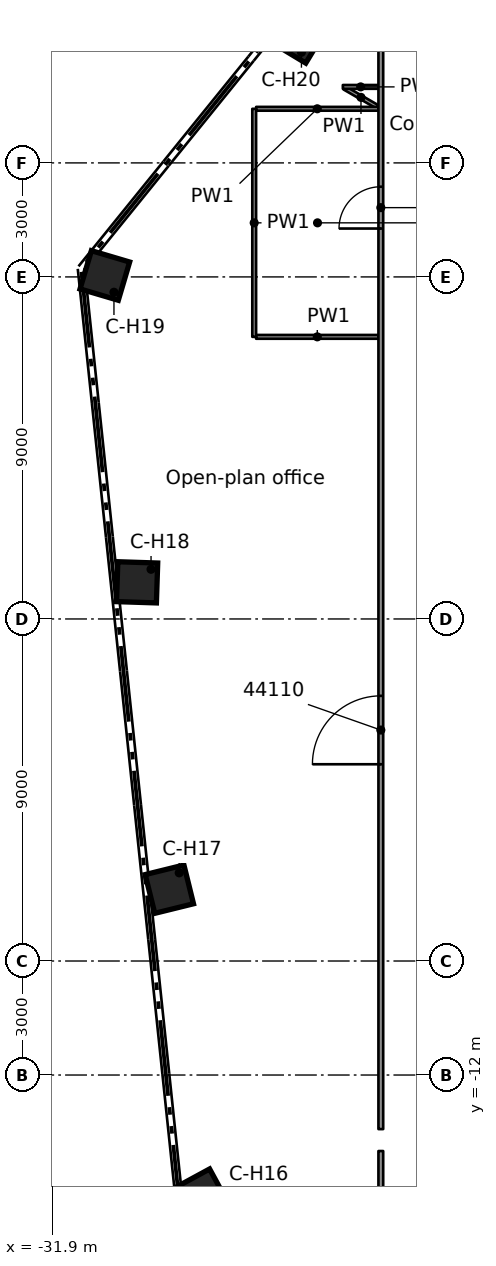
"""IFC4 building model, lengths in metres.
Left out: names, types, materials, properties, quantities, classifications, styles, units other than length and angle.
Written with IfcOpenShell. Run it as: python <this file> out.ifc"""

import sys

from ifc_helpers import new_model, si_unit, direction, frame, frame_2d, origin, origin_2d, place, context, subcontext, project, spatial, rectangle, extrude, element, fill, save


model = new_model("IFC4")
c1 = context("Model", 3, precision=1e-05, world=origin(), true_north=direction((0.0, 1.0)))
c2 = subcontext(c1, "Body", "Model", "MODEL_VIEW")
j1 = project(units=[si_unit("LENGTHUNIT", "METRE"), si_unit("PLANEANGLEUNIT", "RADIAN")], contexts=[c1])
p1 = place(None, origin())
s1 = spatial("IfcSite", under=j1, at=p1, CompositionType="ELEMENT")
p2 = place(p1, origin())
s2 = spatial("IfcBuilding", under=s1, at=p2, CompositionType="ELEMENT")
p3 = place(p2, frame((0.0, 0.0, 217.5)))
s3 = spatial("IfcBuildingStorey", under=s2, at=p3, CompositionType="ELEMENT", Elevation=217.5)
for number, where, z_axis, x_axis in (
    (1, (-27.966, -15.184, 0.0), (0.0, 0.0, 1.0), (-0.879, -0.477, 0.0)),
    (2, (-28.815, -7.11, 0.0), (0.0, 0.0, 1.0), (-0.971, -0.24, 0.0)),
    (3, (-29.663, 0.964, 0.0), (0.0, 0.0, 1.0), (-0.999, 0.032, 0.0)),
    (4, (-30.512, 9.038, 0.0), (0.0, 0.0, 1.0), (-0.959, 0.284, 0.0)),
    (5, (-25.403, 15.347, 0.0), (0.0, 0.0, 1.0), (-0.856, 0.517, 0.0)),
):
    element("IfcColumn", number, at=place(p3, frame(where, z_axis=z_axis, x_axis=x_axis)), inside=s3, PredefinedType="COLUMN", context=c2, shape_type="SweptSolid", body=[
        extrude(rectangle(XDim=1.05, YDim=1.05, at=origin_2d()), origin(), (0.0, 0.0, 1.0), 3.5),
    ])
p4 = place(p3, frame((-24.206, 13.975, 0.0), z_axis=(0.0, 0.0, 1.0), x_axis=(0.866136921896, -0.4998067952, 0.0)))
e6 = element("IfcWall", 6, at=p4, inside=s3, PredefinedType="PARTITIONING", context=c2, shape_type="SweptSolid", body=[
    extrude(rectangle(XDim=1.002, YDim=0.1, at=frame_2d((0.501, 0.0))), origin(), (0.0, 0.0, 1.0), 3.06),
])
p5 = place(p3, frame((-26.532, 7.423, 0.0), z_axis=(0.0, 0.0, 1.0), x_axis=(1.0, 0.0, 0.0)))
e7 = element("IfcWall", 7, at=p5, inside=s3, PredefinedType="PARTITIONING", context=c2, shape_type="SweptSolid", body=[
    extrude(rectangle(XDim=3.22, YDim=0.1, at=frame_2d((1.61, 0.0))), origin(), (0.0, 0.0, 1.0), 3.06),
])
p6 = place(p3, frame((-26.531, 13.424, 0.0), z_axis=(0.0, 0.0, 1.0), x_axis=(1.0, 0.0, 0.0)))
e8 = element("IfcWall", 8, at=p6, inside=s3, PredefinedType="PARTITIONING", context=c2, shape_type="SweptSolid", body=[
    extrude(rectangle(XDim=3.217, YDim=0.1, at=frame_2d((1.608, 0.0))), origin(), (0.0, 0.0, 1.0), 3.06),
])
p7 = place(p3, frame((-24.249, 14.0, 0.0), z_axis=(0.0, 0.0, 1.0), x_axis=(1.0, 0.0, 0.0)))
e9 = element("IfcWall", 9, at=p7, inside=s3, PredefinedType="PARTITIONING", context=c2, shape_type="SweptSolid", body=[
    extrude(rectangle(XDim=0.937, YDim=0.1, at=frame_2d((0.469, 0.0))), origin(), (0.0, 0.0, 1.0), 3.06),
])
p8 = place(p3, frame((-23.25, -16.25, 0.0), z_axis=(0.0, 0.0, 1.0), x_axis=(0.0, 1.0, 0.0)))
e10 = element("IfcWall", 10, at=p8, inside=s3, PredefinedType="PARTITIONING", context=c2, shape_type="SweptSolid", body=[
    extrude(rectangle(XDim=2.25, YDim=0.125, at=frame_2d((1.125, 0.0))), origin(), (0.0, 0.0, 1.0), 3.06),
])
p9 = place(p3, frame((-23.25, -13.423, 0.0), z_axis=(0.0, 0.0, 1.0), x_axis=(0.0, 1.0, 0.0)))
e11 = element("IfcWall", 11, at=p9, inside=s3, PredefinedType="PARTITIONING", context=c2, shape_type="SweptSolid", body=[
    extrude(rectangle(XDim=28.805, YDim=0.125, at=frame_2d((14.403, 0.0))), origin(), (0.0, 0.0, 1.0), 3.06),
])
p10 = place(p9, frame((9.6, 0.0, 0.0)))
e12 = element("IfcOpeningElement", 12, at=p10, cuts=e11, PredefinedType="OPENING", context=c2, shape_type="SweptSolid", body=[
    extrude(rectangle(XDim=1.8, YDim=2.1, at=frame_2d((0.9, 1.05))), frame((0.0, 0.073, 0.0), z_axis=(0.0, -1.0, 0.0), x_axis=(1.0, 0.0, 0.0)), (0.0, 0.0, 1.0), 0.145),
])
p11 = place(p9, frame((23.696, 0.0, 0.0)))
e13 = element("IfcOpeningElement", 13, at=p11, cuts=e11, PredefinedType="OPENING", context=c2, shape_type="SweptSolid", body=[
    extrude(rectangle(XDim=1.1, YDim=2.1, at=frame_2d((0.55, 1.05))), frame((0.0, 0.073, 0.0), z_axis=(0.0, -1.0, 0.0), x_axis=(1.0, 0.0, 0.0)), (0.0, 0.0, 1.0), 0.145),
])
p12 = place(p3, frame((-26.582, 7.423, 0.0), z_axis=(0.0, 0.0, 1.0), x_axis=(0.0, 1.0, 0.0)))
e14 = element("IfcWall", 14, at=p12, inside=s3, PredefinedType="PARTITIONING", context=c2, shape_type="SweptSolid", body=[
    extrude(rectangle(XDim=6.0, YDim=0.1, at=frame_2d((3.0, 0.0))), origin(), (0.0, 0.0, 1.0), 3.06),
])
p13 = place(p10, origin())
e15 = element("IfcDoor", 15, at=p13, inside=s3, OperationType="DOUBLE_DOOR_SINGLE_SWING", PredefinedType="DOOR", context=c2, shape_type="SweptSolid", body=[
    extrude(rectangle(XDim=1.8, YDim=2.1, at=frame_2d((0.9, 1.05))), frame((0.0, 0.025, 0.0), z_axis=(0.0, -1.0, 0.0), x_axis=(1.0, 0.0, 0.0)), (0.0, 0.0, 1.0), 0.05),
])
fill(e12, e15)
p14 = place(p11, origin())
e16 = element("IfcDoor", 16, at=p14, inside=s3, OperationType="SINGLE_SWING_RIGHT", PredefinedType="DOOR", context=c2, shape_type="SweptSolid", body=[
    extrude(rectangle(XDim=1.1, YDim=2.1, at=frame_2d((0.55, 1.05))), frame((0.0, 0.025, 0.0), z_axis=(0.0, -1.0, 0.0), x_axis=(1.0, 0.0, 0.0)), (0.0, 0.0, 1.0), 0.05),
])
fill(e13, e16)
save(model, sys.argv[1])
